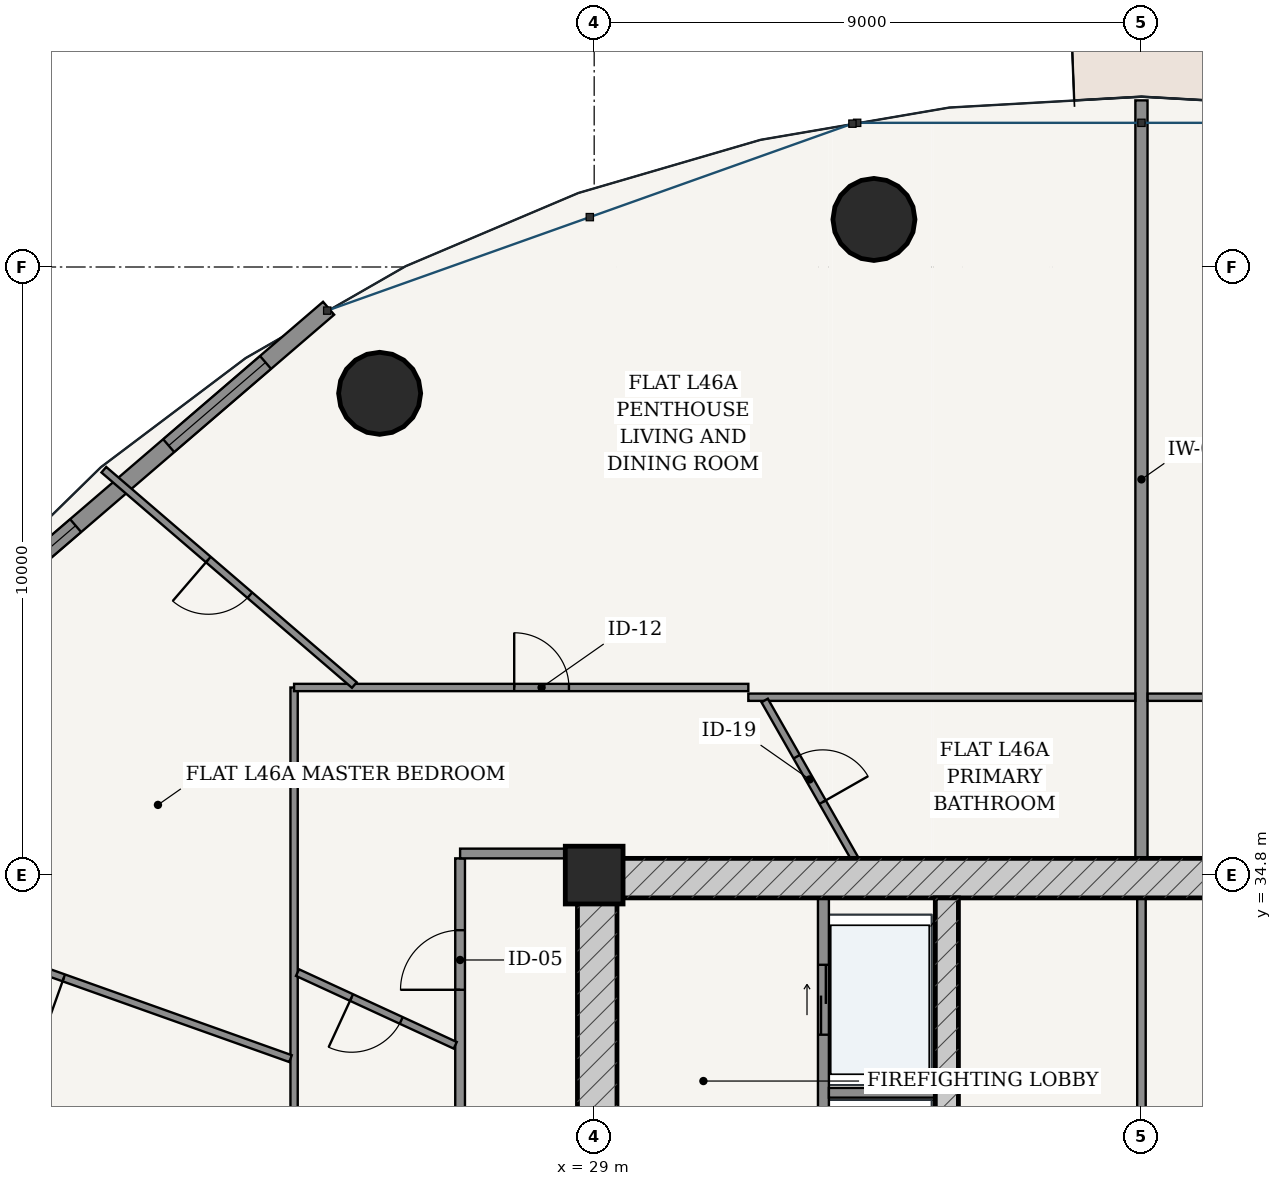
"""IFC4 building model, lengths in metres.
Left out: names, types, materials, properties, quantities, classifications, styles, units other than length and angle.
Written with IfcOpenShell. Run it as: python <this file> out.ifc"""

import sys

from ifc_helpers import new_model, si_unit, direction, frame, frame_2d, origin, origin_2d, place, context, subcontext, project, spatial, rectangle, hollow_circle, extrude, source, transform, mapped, element, fill, save


model = new_model("IFC4")
c1 = context("Model", 3, precision=1e-05, world=origin(), true_north=direction((-0.2419218956, 0.970295726276)))
c2 = subcontext(c1, "Body", "Model", "MODEL_VIEW")
j1 = project(units=[si_unit("LENGTHUNIT", "METRE"), si_unit("PLANEANGLEUNIT", "RADIAN")], contexts=[c1])
p1 = place(None, origin())
s1 = spatial("IfcSite", under=j1, at=p1, CompositionType="ELEMENT")
p2 = place(p1, origin())
s2 = spatial("IfcBuilding", under=s1, at=p2, CompositionType="ELEMENT")
p3 = place(p2, frame((0.0, 0.0, 175.0)))
s3 = spatial("IfcBuildingStorey", under=s2, at=p3, CompositionType="ELEMENT", Elevation=175.0)
p4 = place(p3, frame((29.0, 34.8, 0.0), z_axis=(0.0, 0.0, 1.0), x_axis=(1.0, 0.0, 0.0)))
e1 = element("IfcColumn", 1, at=p4, inside=s3, PredefinedType="COLUMN", context=c2, shape_type="SweptSolid", body=[
    extrude(rectangle(XDim=0.95, YDim=0.95, at=origin_2d()), origin(), (0.0, 0.0, 1.0), 3.6),
])
p5 = place(p3, frame((28.725, 34.75, 0.0), z_axis=(0.0, 0.0, 1.0), x_axis=(1.0, 0.0, 0.0)))
e2 = element("IfcWall", 2, at=p5, inside=s3, PredefinedType="SHEAR", context=c2, shape_type="SweptSolid", body=[
    extrude(rectangle(XDim=18.55, YDim=0.65, at=frame_2d((9.275, 0.0))), origin(), (0.0, 0.0, 1.0), 3.33),
])
p6 = place(p3, frame((29.05, 19.175, 0.0), z_axis=(0.0, 0.0, 1.0), x_axis=(0.0, 1.0, 0.0)))
e3 = element("IfcWall", 3, at=p6, inside=s3, PredefinedType="SHEAR", context=c2, shape_type="SweptSolid", body=[
    extrude(rectangle(XDim=15.25, YDim=0.65, at=frame_2d((7.625, 0.0))), origin(), (0.0, 0.0, 1.0), 3.33),
])
p7 = place(p6, frame((9.875, 0.0, 0.0)))
e4 = element("IfcOpeningElement", 4, at=p7, cuts=e3, PredefinedType="OPENING", context=c2, shape_type="SweptSolid", body=[
    extrude(rectangle(XDim=1.5, YDim=2.2, at=frame_2d((0.75, 1.1))), frame((0.0, 0.335, 0.0), z_axis=(0.0, -1.0, 0.0), x_axis=(1.0, 0.0, 0.0)), (0.0, 0.0, 1.0), 0.67),
])
p8 = place(p3, frame((34.8, 19.175, 0.0), z_axis=(0.0, 0.0, 1.0), x_axis=(0.0, 1.0, 0.0)))
e5 = element("IfcWall", 5, at=p8, inside=s3, PredefinedType="SHEAR", context=c2, shape_type="SweptSolid", body=[
    extrude(rectangle(XDim=15.25, YDim=0.38, at=frame_2d((7.625, 0.0))), origin(), (0.0, 0.0, 1.0), 3.33),
])
p9 = place(p8, frame((7.8, 0.0, 0.0)))
e6 = element("IfcOpeningElement", 6, at=p9, cuts=e5, PredefinedType="OPENING", context=c2, shape_type="SweptSolid", body=[
    extrude(rectangle(XDim=1.05, YDim=2.15, at=frame_2d((0.525, 1.075))), frame((0.0, 0.2, 0.0), z_axis=(0.0, -1.0, 0.0), x_axis=(1.0, 0.0, 0.0)), (0.0, 0.0, 1.0), 0.4),
])
for number, where, z_axis, x_axis in (
    (7, (33.601, 45.582, 0.0), (0.0, 0.0, 1.0), (1.0, 0.0, 0.0)),
    (8, (25.472, 42.723, 0.0), (0.0, 0.0, 1.0), (1.0, 0.0, 0.0)),
):
    element("IfcColumn", number, at=place(p3, frame(where, z_axis=z_axis, x_axis=x_axis)), inside=s3, PredefinedType="COLUMN", context=c2, shape_type="SweptSolid", body=[
        extrude(hollow_circle(Radius=0.675, WallThickness=0.042, at=origin_2d()), origin(), (0.0, 0.0, 1.0), 3.6),
    ])
p10 = place(p3, frame((24.633, 44.122, 0.0), z_axis=(0.0, 0.0, 1.0), x_axis=(-0.75843401647, -0.651749831348, 0.0)))
e9 = element("IfcWall", 9, at=p10, inside=s3, PredefinedType="SOLIDWALL", context=c2, shape_type="SweptSolid", body=[
    extrude(rectangle(XDim=8.952, YDim=0.28, at=frame_2d((4.476, 0.0))), origin(), (0.0, 0.0, 1.0), 3.33),
])
p11 = place(p10, frame((1.367, 0.0, 0.85)))
e10 = element("IfcOpeningElement", 10, at=p11, cuts=e9, PredefinedType="OPENING", context=c2, shape_type="SweptSolid", body=[
    extrude(rectangle(XDim=2.1, YDim=1.95, at=frame_2d((1.05, 0.975))), frame((0.0, 0.15, 0.0), z_axis=(0.0, -1.0, 0.0), x_axis=(1.0, 0.0, 0.0)), (0.0, 0.0, 1.0), 0.3),
])
p12 = place(p10, frame((5.485, 0.0, 0.85)))
e11 = element("IfcOpeningElement", 11, at=p12, cuts=e9, PredefinedType="OPENING", context=c2, shape_type="SweptSolid", body=[
    extrude(rectangle(XDim=2.1, YDim=1.95, at=frame_2d((1.05, 0.975))), frame((0.0, 0.15, 0.0), z_axis=(0.0, -1.0, 0.0), x_axis=(1.0, 0.0, 0.0)), (0.0, 0.0, 1.0), 0.3),
])
p13 = place(p3, frame((32.77, 28.52, 0.0), z_axis=(0.0, 0.0, 1.0), x_axis=(0.0, 1.0, 0.0)))
e12 = element("IfcWall", 12, at=p13, inside=s3, PredefinedType="PARTITIONING", context=c2, shape_type="SweptSolid", body=[
    extrude(rectangle(XDim=5.905, YDim=0.18, at=frame_2d((2.953, 0.0))), origin(), (0.0, 0.0, 1.0), 3.33),
])
p14 = place(p13, frame((3.655, 0.0, 0.0)))
e13 = element("IfcOpeningElement", 13, at=p14, cuts=e12, PredefinedType="OPENING", context=c2, shape_type="SweptSolid", body=[
    extrude(rectangle(XDim=1.15, YDim=2.2, at=frame_2d((0.575, 1.1))), frame((0.0, 0.1, 0.0), z_axis=(0.0, -1.0, 0.0), x_axis=(1.0, 0.0, 0.0)), (0.0, 0.0, 1.0), 0.2),
])
p15 = place(p13, frame((0.73, 0.0, 0.0)))
e14 = element("IfcOpeningElement", 14, at=p15, cuts=e12, PredefinedType="OPENING", context=c2, shape_type="SweptSolid", body=[
    extrude(rectangle(XDim=1.2, YDim=2.25, at=frame_2d((0.6, 1.125))), frame((0.0, 0.1, 0.0), z_axis=(0.0, -1.0, 0.0), x_axis=(1.0, 0.0, 0.0)), (0.0, 0.0, 1.0), 0.2),
])
p16 = place(p3, frame((32.86, 31.22, 0.0), z_axis=(0.0, 0.0, 1.0), x_axis=(1.0, 0.0, 0.0)))
e15 = element("IfcWall", 15, at=p16, inside=s3, PredefinedType="PARTITIONING", context=c2, shape_type="SweptSolid", body=[
    extrude(rectangle(XDim=1.75, YDim=0.16, at=frame_2d((0.875, 0.0))), origin(), (0.0, 0.0, 1.0), 3.33),
])
p17 = place(p3, frame((38.0, 28.56, 0.0), z_axis=(0.0, 0.0, 1.0), x_axis=(0.0, 1.0, 0.0)))
e16 = element("IfcWall", 16, at=p17, inside=s3, PredefinedType="PARTITIONING", context=c2, shape_type="SweptSolid", body=[
    extrude(rectangle(XDim=5.865, YDim=0.14, at=frame_2d((2.933, 0.0))), origin(), (0.0, 0.0, 1.0), 3.33),
])
p18 = place(p3, frame((26.795, 24.4, 0.0), z_axis=(0.0, 0.0, 1.0), x_axis=(0.0, 1.0, 0.0)))
e17 = element("IfcWall", 17, at=p18, inside=s3, PredefinedType="PARTITIONING", context=c2, shape_type="SweptSolid", body=[
    extrude(rectangle(XDim=10.675, YDim=0.16, at=frame_2d((5.337, 0.0))), origin(), (0.0, 0.0, 1.0), 2.776),
])
p19 = place(p18, frame((8.514, 0.0, 0.0)))
e18 = element("IfcOpeningElement", 18, at=p19, cuts=e17, PredefinedType="OPENING", context=c2, shape_type="SweptSolid", body=[
    extrude(rectangle(XDim=0.98, YDim=2.2, at=frame_2d((0.49, 1.1))), frame((0.0, 0.09, 0.0), z_axis=(0.0, -1.0, 0.0), x_axis=(1.0, 0.0, 0.0)), (0.0, 0.0, 1.0), 0.18),
])
p20 = place(p3, frame((26.795, 35.155, 0.0), z_axis=(0.0, 0.0, 1.0), x_axis=(1.0, 0.0, 0.0)))
e19 = element("IfcWall", 19, at=p20, inside=s3, PredefinedType="PARTITIONING", context=c2, shape_type="SweptSolid", body=[
    extrude(rectangle(XDim=1.93, YDim=0.16, at=frame_2d((0.965, 0.0))), origin(), (0.0, 0.0, 1.0), 2.776),
])
p21 = place(p3, frame((38.0, 35.075, 0.0), z_axis=(0.0, 0.0, 1.0), x_axis=(0.0, 1.0, 0.0)))
e20 = element("IfcWall", 20, at=p21, inside=s3, PredefinedType="PARTITIONING", context=c2, shape_type="SweptSolid", body=[
    extrude(rectangle(XDim=12.465, YDim=0.2, at=frame_2d((6.232, 0.0))), origin(), (0.0, 0.0, 1.0), 2.415),
])
p22 = place(p3, frame((24.065, 21.59, 0.0), z_axis=(0.0, 0.0, 1.0), x_axis=(0.0, 1.0, 0.0)))
e21 = element("IfcWall", 21, at=p22, inside=s3, PredefinedType="PARTITIONING", context=c2, shape_type="SweptSolid", body=[
    extrude(rectangle(XDim=16.295, YDim=0.12, at=frame_2d((8.147, 0.0))), origin(), (0.0, 0.0, 1.0), 2.776),
])
p23 = place(p3, frame((24.065, 37.885, 0.0), z_axis=(0.0, 0.0, 1.0), x_axis=(1.0, 0.0, 0.0)))
e22 = element("IfcWall", 22, at=p23, inside=s3, PredefinedType="PARTITIONING", context=c2, shape_type="SweptSolid", body=[
    extrude(rectangle(XDim=7.47, YDim=0.12, at=frame_2d((3.735, 0.0))), origin(), (0.0, 0.0, 1.0), 2.776),
])
p24 = place(p23, frame((3.62, 0.0, 0.0)))
e23 = element("IfcOpeningElement", 23, at=p24, cuts=e22, PredefinedType="OPENING", context=c2, shape_type="SweptSolid", body=[
    extrude(rectangle(XDim=0.9, YDim=2.15, at=frame_2d((0.45, 1.075))), frame((0.0, 0.07, 0.0), z_axis=(0.0, -1.0, 0.0), x_axis=(1.0, 0.0, 0.0)), (0.0, 0.0, 1.0), 0.14),
])
p25 = place(p3, frame((31.535, 37.725, 0.0), z_axis=(0.0, 0.0, 1.0), x_axis=(1.0, 0.0, 0.0)))
e24 = element("IfcWall", 24, at=p25, inside=s3, PredefinedType="PARTITIONING", context=c2, shape_type="SweptSolid", body=[
    extrude(rectangle(XDim=6.363, YDim=0.12, at=frame_2d((3.182, 0.0))), origin(), (0.0, 0.0, 1.0), 2.776),
])
p26 = place(p3, frame((25.056, 37.925, 0.0), z_axis=(0.0, 0.0, 1.0), x_axis=(-0.758354915574, 0.65184186888, 0.0)))
e25 = element("IfcWall", 25, at=p26, inside=s3, PredefinedType="PARTITIONING", context=c2, shape_type="SweptSolid", body=[
    extrude(rectangle(XDim=5.432, YDim=0.12, at=frame_2d((2.716, 0.0))), origin(), (0.0, 0.0, 1.0), 2.846),
])
p27 = place(p26, frame((2.266, 0.0, 0.0)))
e26 = element("IfcOpeningElement", 26, at=p27, cuts=e25, PredefinedType="OPENING", context=c2, shape_type="SweptSolid", body=[
    extrude(rectangle(XDim=0.9, YDim=2.15, at=frame_2d((0.45, 1.075))), frame((0.0, 0.07, 0.0), z_axis=(0.0, -1.0, 0.0), x_axis=(1.0, 0.0, 0.0)), (0.0, 0.0, 1.0), 0.14),
])
p28 = place(p3, frame((24.007, 31.782, 0.0), z_axis=(0.0, 0.0, 1.0), x_axis=(-0.942077868165, 0.335394231187, 0.0)))
e27 = element("IfcWall", 27, at=p28, inside=s3, PredefinedType="PARTITIONING", context=c2, shape_type="SweptSolid", body=[
    extrude(rectangle(XDim=8.817, YDim=0.12, at=frame_2d((4.408, 0.0))), origin(), (0.0, 0.0, 1.0), 2.846),
])
p29 = place(p28, frame((3.958, 0.0, 0.0)))
e28 = element("IfcOpeningElement", 28, at=p29, cuts=e27, PredefinedType="OPENING", context=c2, shape_type="SweptSolid", body=[
    extrude(rectangle(XDim=0.9, YDim=2.15, at=frame_2d((0.45, 1.075))), frame((0.0, 0.07, 0.0), z_axis=(0.0, -1.0, 0.0), x_axis=(1.0, 0.0, 0.0)), (0.0, 0.0, 1.0), 0.14),
])
p30 = place(p3, frame((33.283, 35.075, 0.0), z_axis=(0.0, 0.0, 1.0), x_axis=(-0.495179611311, 0.868790626412, 0.0)))
e29 = element("IfcWall", 29, at=p30, inside=s3, PredefinedType="PARTITIONING", context=c2, shape_type="SweptSolid", body=[
    extrude(rectangle(XDim=2.988, YDim=0.12, at=frame_2d((1.494, 0.0))), origin(), (0.0, 0.0, 1.0), 3.33),
])
p31 = place(p30, frame((1.064, 0.0, 0.0)))
e30 = element("IfcOpeningElement", 30, at=p31, cuts=e29, PredefinedType="OPENING", context=c2, shape_type="SweptSolid", body=[
    extrude(rectangle(XDim=0.86, YDim=2.15, at=frame_2d((0.43, 1.075))), frame((0.0, 0.07, 0.0), z_axis=(0.0, -1.0, 0.0), x_axis=(1.0, 0.0, 0.0)), (0.0, 0.0, 1.0), 0.14),
])
p32 = place(p3, frame((26.715, 32.001, 0.0), z_axis=(0.0, 0.0, 1.0), x_axis=(-0.90819942915, 0.418537688735, 0.0)))
e31 = element("IfcWall", 31, at=p32, inside=s3, PredefinedType="PARTITIONING", context=c2, shape_type="SweptSolid", body=[
    extrude(rectangle(XDim=2.856, YDim=0.12, at=frame_2d((1.428, 0.0))), origin(), (0.0, 0.0, 1.0), 3.33),
])
p33 = place(p32, frame((0.978, 0.0, 0.0)))
e32 = element("IfcOpeningElement", 32, at=p33, cuts=e31, PredefinedType="OPENING", context=c2, shape_type="SweptSolid", body=[
    extrude(rectangle(XDim=0.9, YDim=2.15, at=frame_2d((0.45, 1.075))), frame((0.0, 0.07, 0.0), z_axis=(0.0, -1.0, 0.0), x_axis=(1.0, 0.0, 0.0)), (0.0, 0.0, 1.0), 0.14),
])
p34 = place(p3, frame((38.102, 37.725, 0.0), z_axis=(0.0, 0.0, 1.0), x_axis=(1.0, 0.0, 0.0)))
e33 = element("IfcWall", 33, at=p34, inside=s3, PredefinedType="PARTITIONING", context=c2, shape_type="SweptSolid", body=[
    extrude(rectangle(XDim=6.363, YDim=0.12, at=frame_2d((3.182, 0.0))), origin(), (0.0, 0.0, 1.0), 2.776),
])
m1 = source(origin(), c2, "Body", "SweptSolid", [
    extrude(rectangle(XDim=2.1, YDim=1.95, at=frame_2d((1.05, 0.975))), frame((0.0, 0.03, 0.0), z_axis=(0.0, -1.0, 0.0), x_axis=(1.0, 0.0, 0.0)), (0.0, 0.0, 1.0), 0.06),
])
p35 = place(p11, origin())
e34 = element("IfcWindow", 34, at=p35, inside=s3, PartitioningType="SINGLE_PANEL", PredefinedType="WINDOW", context=c2, shape_type="MappedRepresentation", body=[
    mapped(m1, transform((0.0, 0.0, 0.0), scale=1.0)),
])
fill(e10, e34)
p36 = place(p12, origin())
e35 = element("IfcWindow", 35, at=p36, inside=s3, PartitioningType="SINGLE_PANEL", PredefinedType="WINDOW", context=c2, shape_type="MappedRepresentation", body=[
    mapped(m1, transform((0.0, 0.0, 0.0), scale=1.0)),
])
fill(e11, e35)
m2 = source(origin(), c2, "Body", "SweptSolid", [
    extrude(rectangle(XDim=1.15, YDim=2.2, at=frame_2d((0.575, 1.1))), frame((0.0, 0.025, 0.0), z_axis=(0.0, -1.0, 0.0), x_axis=(1.0, 0.0, 0.0)), (0.0, 0.0, 1.0), 0.05),
])
p37 = place(p14, origin())
e36 = element("IfcDoor", 36, at=p37, inside=s3, OperationType="DOUBLE_DOOR_SLIDING", PredefinedType="DOOR", context=c2, shape_type="MappedRepresentation", body=[
    mapped(m2, transform((0.0, 0.0, 0.0), scale=1.0)),
])
fill(e13, e36)
m3 = source(origin(), c2, "Body", "SweptSolid", [
    extrude(rectangle(XDim=0.98, YDim=2.2, at=frame_2d((0.49, 1.1))), frame((0.0, 0.025, 0.0), z_axis=(0.0, -1.0, 0.0), x_axis=(1.0, 0.0, 0.0)), (0.0, 0.0, 1.0), 0.05),
])
p38 = place(p19, origin())
e37 = element("IfcDoor", 37, at=p38, inside=s3, OperationType="SINGLE_SWING_LEFT", PredefinedType="DOOR", context=c2, shape_type="MappedRepresentation", body=[
    mapped(m3, transform((0.0, 0.0, 0.0), scale=1.0)),
])
fill(e18, e37)
m4 = source(origin(), c2, "Body", "SweptSolid", [
    extrude(rectangle(XDim=0.86, YDim=2.15, at=frame_2d((0.43, 1.075))), frame((0.0, 0.025, 0.0), z_axis=(0.0, -1.0, 0.0), x_axis=(1.0, 0.0, 0.0)), (0.0, 0.0, 1.0), 0.05),
])
p39 = place(p31, frame((0.86, 0.0, 0.0), z_axis=(0.0, 0.0, 1.0), x_axis=(-1.0, 0.0, 0.0)))
e38 = element("IfcDoor", 38, at=p39, inside=s3, OperationType="SINGLE_SWING_RIGHT", PredefinedType="DOOR", context=c2, shape_type="MappedRepresentation", body=[
    mapped(m4, transform((0.0, 0.0, 0.0), scale=1.0)),
])
fill(e30, e38)
m5 = source(origin(), c2, "Body", "SweptSolid", [
    extrude(rectangle(XDim=0.9, YDim=2.15, at=frame_2d((0.45, 1.075))), frame((0.0, 0.025, 0.0), z_axis=(0.0, -1.0, 0.0), x_axis=(1.0, 0.0, 0.0)), (0.0, 0.0, 1.0), 0.05),
])
p40 = place(p24, origin())
e39 = element("IfcDoor", 39, at=p40, inside=s3, OperationType="SINGLE_SWING_LEFT", PredefinedType="DOOR", context=c2, shape_type="MappedRepresentation", body=[
    mapped(m5, transform((0.0, 0.0, 0.0), scale=1.0)),
])
fill(e23, e39)
p41 = place(p33, origin())
e40 = element("IfcDoor", 40, at=p41, inside=s3, OperationType="SINGLE_SWING_RIGHT", PredefinedType="DOOR", context=c2, shape_type="MappedRepresentation", body=[
    mapped(m5, transform((0.0, 0.0, 0.0), scale=1.0)),
])
fill(e32, e40)
p42 = place(p27, origin())
e41 = element("IfcDoor", 41, at=p42, inside=s3, OperationType="SINGLE_SWING_RIGHT", PredefinedType="DOOR", context=c2, shape_type="MappedRepresentation", body=[
    mapped(m5, transform((0.0, 0.0, 0.0), scale=1.0)),
])
fill(e26, e41)
p43 = place(p29, origin())
e42 = element("IfcDoor", 42, at=p43, inside=s3, OperationType="SINGLE_SWING_LEFT", PredefinedType="DOOR", context=c2, shape_type="MappedRepresentation", body=[
    mapped(m5, transform((0.0, 0.0, 0.0), scale=1.0)),
])
fill(e28, e42)
save(model, sys.argv[1])
